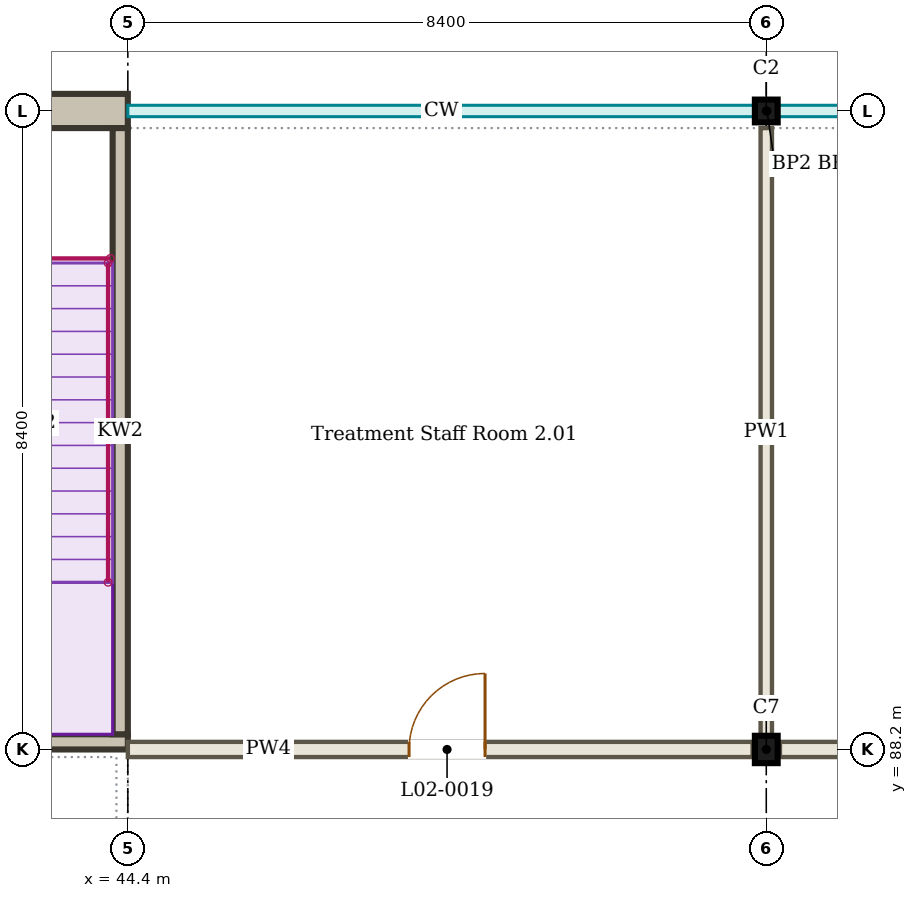
"""IFC4 building model, lengths in metres.
Left out: names, types, materials, properties, quantities, classifications, styles, units other than length and angle.
Written with IfcOpenShell. Run it as: python <this file> out.ifc"""

import sys

from ifc_helpers import new_model, si_unit, direction, frame, frame_2d, origin, origin_2d, place, context, subcontext, project, spatial, rectangle, i_section, extrude, element, fill, save


model = new_model("IFC4")
c1 = context("Model", 3, precision=1e-05, world=origin(), true_north=direction((0.0, 1.0)))
c2 = subcontext(c1, "Body", "Model", "MODEL_VIEW")
j1 = project(units=[si_unit("LENGTHUNIT", "METRE"), si_unit("PLANEANGLEUNIT", "RADIAN")], contexts=[c1])
p1 = place(None, origin())
s1 = spatial("IfcSite", under=j1, at=p1, CompositionType="ELEMENT")
p2 = place(p1, origin())
s2 = spatial("IfcBuilding", under=s1, at=p2, CompositionType="ELEMENT")
p3 = place(p2, frame((0.0, 0.0, 9.0)))
s3 = spatial("IfcBuildingStorey", under=s2, at=p3, CompositionType="ELEMENT", Elevation=9.0)
p4 = place(p3, frame((52.8, 88.2, 0.0), z_axis=(0.0, 0.0, 1.0), x_axis=(1.0, 0.0, 0.0)))
e1 = element("IfcColumn", 1, at=p4, inside=s3, PredefinedType="COLUMN", context=c2, shape_type="SweptSolid", body=[
    extrude(i_section(OverallWidth=0.3, OverallDepth=0.36, WebThickness=0.012, FlangeThickness=0.022, FilletRadius=0.027, at=origin_2d()), origin(), (0.0, 0.0, 1.0), 4.5),
])
p5 = place(p3, frame((52.8, 96.6, 0.0), z_axis=(0.0, 0.0, 1.0), x_axis=(1.0, 0.0, 0.0)))
e2 = element("IfcColumn", 2, at=p5, inside=s3, PredefinedType="COLUMN", context=c2, shape_type="SweptSolid", body=[
    extrude(i_section(OverallWidth=0.3, OverallDepth=0.3, WebThickness=0.011, FlangeThickness=0.019, FilletRadius=0.027, at=origin_2d()), origin(), (0.0, 0.0, 1.0), 4.5),
])
p6 = place(p3, frame((44.4, 88.2, 0.0), z_axis=(0.0, 0.0, 1.0), x_axis=(1.0, 0.0, 0.0)))
e3 = element("IfcWall", 3, at=p6, inside=s3, PredefinedType="PARTITIONING", context=c2, shape_type="SweptSolid", body=[
    extrude(rectangle(XDim=8.22, YDim=0.2, at=frame_2d((4.11, 0.0))), origin(), (0.0, 0.0, 1.0), 3.9),
])
p7 = place(p6, frame((3.7, 0.0, 0.0)))
e4 = element("IfcOpeningElement", 4, at=p7, cuts=e3, PredefinedType="OPENING", context=c2, shape_type="SweptSolid", body=[
    extrude(rectangle(XDim=1.0, YDim=2.1, at=frame_2d((0.5, 1.05))), frame((0.0, 0.11, 0.0), z_axis=(0.0, -1.0, 0.0), x_axis=(1.0, 0.0, 0.0)), (0.0, 0.0, 1.0), 0.22),
])
p8 = place(p3, frame((52.98, 88.2, 0.0), z_axis=(0.0, 0.0, 1.0), x_axis=(1.0, 0.0, 0.0)))
e5 = element("IfcWall", 5, at=p8, inside=s3, PredefinedType="PARTITIONING", context=c2, shape_type="SweptSolid", body=[
    extrude(rectangle(XDim=8.04, YDim=0.2, at=frame_2d((4.02, 0.0))), origin(), (0.0, 0.0, 1.0), 3.9),
])
p9 = place(p8, frame((3.52, 0.0, 0.0)))
e6 = element("IfcOpeningElement", 6, at=p9, cuts=e5, PredefinedType="OPENING", context=c2, shape_type="SweptSolid", body=[
    extrude(rectangle(XDim=1.0, YDim=2.1, at=frame_2d((0.5, 1.05))), frame((0.0, 0.11, 0.0), z_axis=(0.0, -1.0, 0.0), x_axis=(1.0, 0.0, 0.0)), (0.0, 0.0, 1.0), 0.22),
])
p10 = place(p3, frame((52.8, 88.38, 0.0), z_axis=(0.0, 0.0, 1.0), x_axis=(0.0, 1.0, 0.0)))
e7 = element("IfcWall", 7, at=p10, inside=s3, PredefinedType="PARTITIONING", context=c2, shape_type="SweptSolid", body=[
    extrude(rectangle(XDim=7.995, YDim=0.15, at=frame_2d((3.998, 0.0))), origin(), (0.0, 0.0, 1.0), 3.9),
])
p11 = place(p3, frame((44.4, 88.3, 0.0), z_axis=(0.0, 0.0, 1.0), x_axis=(-1.0, 0.0, 0.0)))
e8 = element("IfcWall", 8, at=p11, inside=s3, PredefinedType="SOLIDWALL", context=c2, shape_type="SweptSolid", body=[
    extrude(rectangle(XDim=8.4, YDim=0.2, at=frame_2d((4.2, 0.0))), origin(), (0.0, 0.0, 1.0), 4.5),
])
p12 = place(p11, frame((4.725, 0.0, 0.0)))
e9 = element("IfcOpeningElement", 9, at=p12, cuts=e8, PredefinedType="OPENING", context=c2, shape_type="SweptSolid", body=[
    extrude(rectangle(XDim=1.3, YDim=2.1, at=frame_2d((0.65, 1.05))), frame((0.0, 0.11, 0.0), z_axis=(0.0, -1.0, 0.0), x_axis=(1.0, 0.0, 0.0)), (0.0, 0.0, 1.0), 0.22),
])
p13 = place(p3, frame((44.4, 96.6, 0.0), z_axis=(0.0, 0.0, 1.0), x_axis=(-1.0, 0.0, 0.0)))
e10 = element("IfcWall", 10, at=p13, inside=s3, PredefinedType="SOLIDWALL", context=c2, shape_type="SweptSolid", body=[
    extrude(rectangle(XDim=8.4, YDim=0.45, at=frame_2d((4.2, 0.0))), origin(), (0.0, 0.0, 1.0), 4.5),
])
p14 = place(p3, frame((44.3, 88.4, 0.0), z_axis=(0.0, 0.0, 1.0), x_axis=(0.0, 1.0, 0.0)))
e11 = element("IfcWall", 11, at=p14, inside=s3, PredefinedType="SOLIDWALL", context=c2, shape_type="SweptSolid", body=[
    extrude(rectangle(XDim=7.975, YDim=0.2, at=frame_2d((3.988, 0.0))), origin(), (0.0, 0.0, 1.0), 4.5),
])
p15 = place(p7, origin())
e12 = element("IfcDoor", 12, at=p15, inside=s3, OperationType="SINGLE_SWING_RIGHT", PredefinedType="DOOR", context=c2, shape_type="SweptSolid", body=[
    extrude(rectangle(XDim=1.0, YDim=2.1, at=frame_2d((0.5, 1.05))), frame((0.0, 0.025, 0.0), z_axis=(0.0, -1.0, 0.0), x_axis=(1.0, 0.0, 0.0)), (0.0, 0.0, 1.0), 0.05),
])
fill(e4, e12)
save(model, sys.argv[1])
